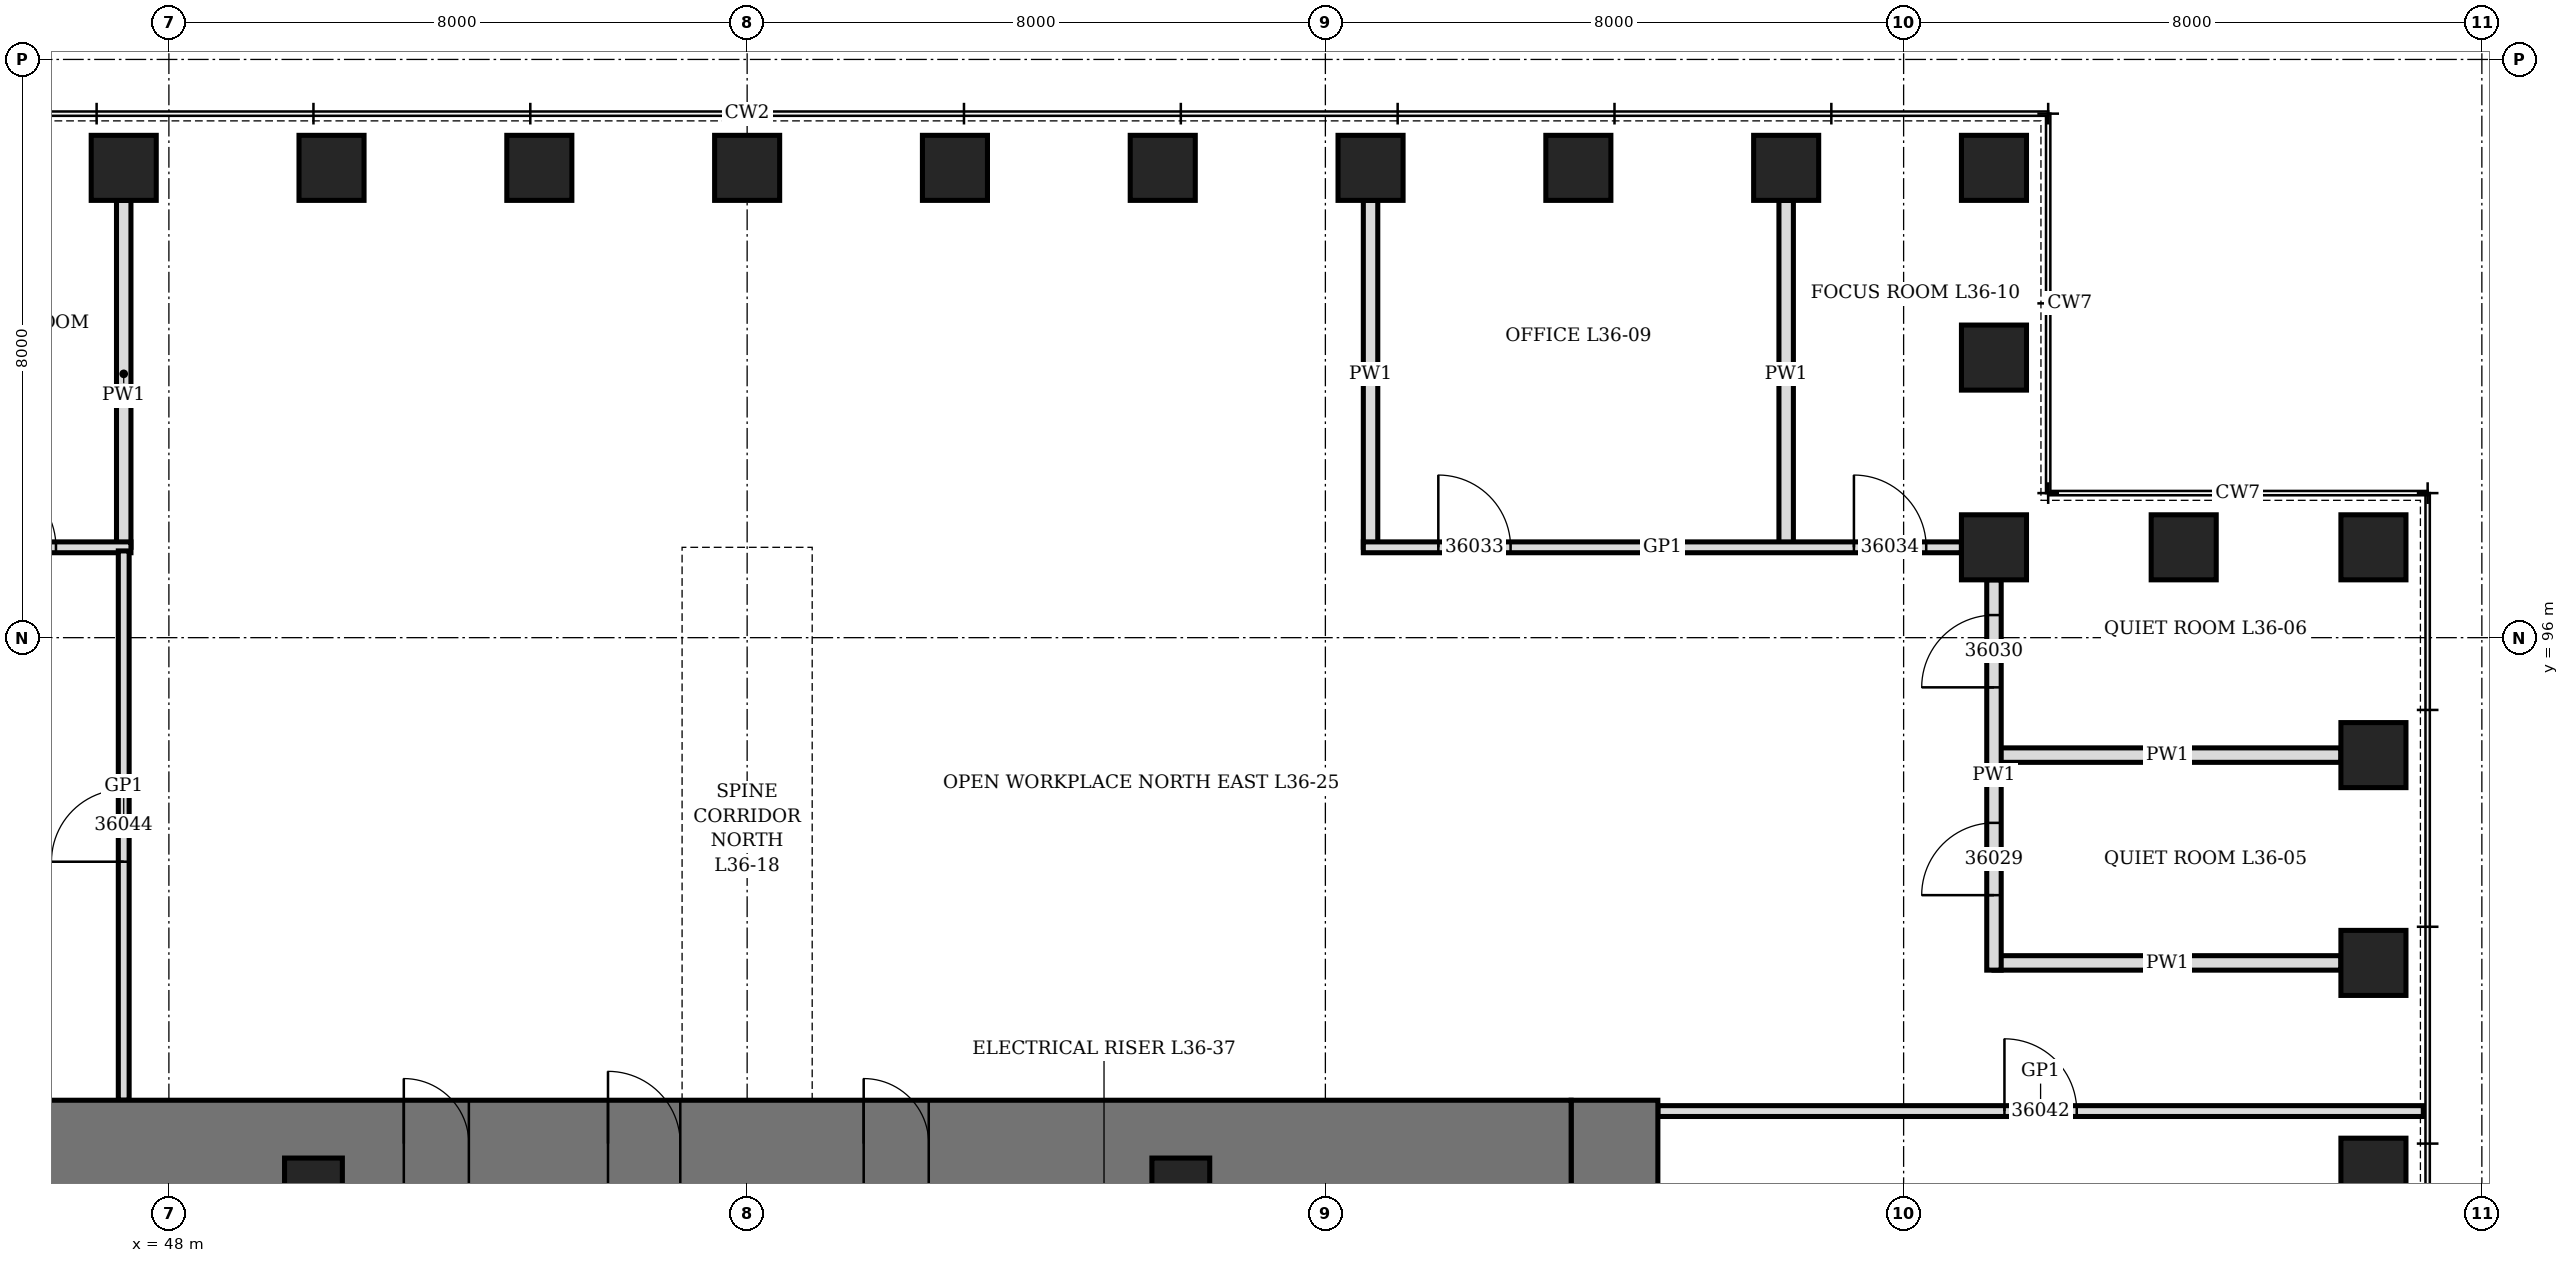
"""IFC4 building model, lengths in metres.
Left out: names, types, materials, properties, quantities, classifications, styles, units other than length and angle.
Written with IfcOpenShell. Run it as: python <this file> out.ifc"""

import sys

from ifc_helpers import new_model, si_unit, direction, frame, frame_2d, origin, origin_2d, place, context, subcontext, project, spatial, rectangle, hollow_rectangle, extrude, element, fill, save


model = new_model("IFC4")
c1 = context("Model", 3, precision=1e-05, world=origin(), true_north=direction((0.0, 1.0)))
c2 = subcontext(c1, "Body", "Model", "MODEL_VIEW")
j1 = project(units=[si_unit("LENGTHUNIT", "METRE"), si_unit("PLANEANGLEUNIT", "RADIAN")], contexts=[c1])
p1 = place(None, origin())
s1 = spatial("IfcSite", under=j1, at=p1, CompositionType="ELEMENT")
p2 = place(p1, origin())
s2 = spatial("IfcBuilding", under=s1, at=p2, CompositionType="ELEMENT")
p3 = place(p2, frame((0.0, 0.0, 162.7)))
s3 = spatial("IfcBuildingStorey", under=s2, at=p3, CompositionType="ELEMENT", Elevation=162.7)
for number, where, z_axis, x_axis in (
    (1, (78.5, 88.625, 0.0), (0.0, 0.0, 1.0), (0.0, 1.0, 0.0)),
    (2, (78.5, 91.5, 0.0), (0.0, 0.0, 1.0), (0.0, 1.0, 0.0)),
    (3, (78.5, 94.375, 0.0), (0.0, 0.0, 1.0), (0.0, 1.0, 0.0)),
    (4, (78.5, 97.25, 0.0), (0.0, 0.0, 1.0), (1.0, 0.0, 0.0)),
    (5, (75.875, 97.25, 0.0), (0.0, 0.0, 1.0), (1.0, 0.0, 0.0)),
    (6, (73.25, 97.25, 0.0), (0.0, 0.0, 1.0), (0.0, 1.0, 0.0)),
    (7, (73.25, 99.875, 0.0), (0.0, 0.0, 1.0), (0.0, 1.0, 0.0)),
    (8, (73.25, 102.5, 0.0), (0.0, 0.0, 1.0), (1.0, 0.0, 0.0)),
    (9, (70.375, 102.5, 0.0), (0.0, 0.0, 1.0), (1.0, 0.0, 0.0)),
    (10, (67.5, 102.5, 0.0), (0.0, 0.0, 1.0), (1.0, 0.0, 0.0)),
    (11, (64.625, 102.5, 0.0), (0.0, 0.0, 1.0), (1.0, 0.0, 0.0)),
    (12, (61.75, 102.5, 0.0), (0.0, 0.0, 1.0), (1.0, 0.0, 0.0)),
    (13, (58.875, 102.5, 0.0), (0.0, 0.0, 1.0), (1.0, 0.0, 0.0)),
    (14, (56.0, 102.5, 0.0), (0.0, 0.0, 1.0), (1.0, 0.0, 0.0)),
    (15, (53.125, 102.5, 0.0), (0.0, 0.0, 1.0), (1.0, 0.0, 0.0)),
    (16, (50.25, 102.5, 0.0), (0.0, 0.0, 1.0), (1.0, 0.0, 0.0)),
    (17, (47.375, 102.5, 0.0), (0.0, 0.0, 1.0), (1.0, 0.0, 0.0)),
):
    element("IfcColumn", number, at=place(p3, frame(where, z_axis=z_axis, x_axis=x_axis)), inside=s3, PredefinedType="COLUMN", context=c2, shape_type="SweptSolid", body=[
        extrude(hollow_rectangle(XDim=0.9, YDim=0.9, WallThickness=0.12, at=origin_2d()), origin(), (0.0, 0.0, 1.0), 4.2),
    ])
p4 = place(p3, frame((68.0, 70.4, 0.0), z_axis=(0.0, 0.0, 1.0), x_axis=(0.0, 1.0, 0.0)))
e18 = element("IfcWall", 18, at=p4, inside=s3, PredefinedType="SHEAR", context=c2, shape_type="SweptSolid", body=[
    extrude(rectangle(XDim=19.2, YDim=1.2, at=frame_2d((9.6, 0.0))), origin(), (0.0, 0.0, 1.0), 4.2),
])
p5 = place(p4, frame((8.6, 0.0, 0.0)))
e19 = element("IfcOpeningElement", 19, at=p5, cuts=e18, PredefinedType="OPENING", context=c2, shape_type="SweptSolid", body=[
    extrude(rectangle(XDim=2.0, YDim=2.4, at=frame_2d((1.0, 1.2))), frame((0.0, 0.61, 0.0), z_axis=(0.0, -1.0, 0.0), x_axis=(1.0, 0.0, 0.0)), (0.0, 0.0, 1.0), 1.22),
])
p6 = place(p3, frame((44.6, 89.0, 0.0), z_axis=(0.0, 0.0, 1.0), x_axis=(1.0, 0.0, 0.0)))
e20 = element("IfcWall", 20, at=p6, inside=s3, PredefinedType="SHEAR", context=c2, shape_type="SweptSolid", body=[
    extrude(rectangle(XDim=22.8, YDim=1.2, at=frame_2d((11.4, 0.0))), origin(), (0.0, 0.0, 1.0), 4.2),
])
p7 = place(p6, frame((9.475, 0.0, 0.0)))
e21 = element("IfcOpeningElement", 21, at=p7, cuts=e20, PredefinedType="OPENING", context=c2, shape_type="SweptSolid", body=[
    extrude(rectangle(XDim=1.0, YDim=2.1, at=frame_2d((0.5, 1.05))), frame((0.0, 0.61, 0.0), z_axis=(0.0, -1.0, 0.0), x_axis=(1.0, 0.0, 0.0)), (0.0, 0.0, 1.0), 1.22),
])
p8 = place(p6, frame((6.65, 0.0, 0.0)))
e22 = element("IfcOpeningElement", 22, at=p8, cuts=e20, PredefinedType="OPENING", context=c2, shape_type="SweptSolid", body=[
    extrude(rectangle(XDim=0.9, YDim=2.1, at=frame_2d((0.45, 1.05))), frame((0.0, 0.61, 0.0), z_axis=(0.0, -1.0, 0.0), x_axis=(1.0, 0.0, 0.0)), (0.0, 0.0, 1.0), 1.22),
])
p9 = place(p6, frame((13.012, 0.0, 0.0)))
e23 = element("IfcOpeningElement", 23, at=p9, cuts=e20, PredefinedType="OPENING", context=c2, shape_type="SweptSolid", body=[
    extrude(rectangle(XDim=0.9, YDim=2.1, at=frame_2d((0.45, 1.05))), frame((0.0, 0.61, 0.0), z_axis=(0.0, -1.0, 0.0), x_axis=(1.0, 0.0, 0.0)), (0.0, 0.0, 1.0), 1.22),
])
for number, where, z_axis, x_axis in (
    (24, (50.0, 88.4, 0.0), (0.0, 0.0, 1.0), (1.0, 0.0, 0.0)),
    (25, (62.0, 88.4, 0.0), (0.0, 0.0, 1.0), (1.0, 0.0, 0.0)),
):
    element("IfcColumn", number, at=place(p3, frame(where, z_axis=z_axis, x_axis=x_axis)), inside=s3, PredefinedType="COLUMN", context=c2, shape_type="SweptSolid", body=[
        extrude(hollow_rectangle(XDim=0.8, YDim=0.8, WallThickness=0.1, at=origin_2d()), origin(), (0.0, 0.0, 1.0), 4.2),
    ])
for number, where, z_axis, x_axis in (
    (26, (73.25, 91.5, 0.0), (0.0, 0.0, 1.0), (1.0, 0.0, 0.0)),
    (27, (73.25, 94.375, 0.0), (0.0, 0.0, 1.0), (1.0, 0.0, 0.0)),
):
    element("IfcWall", number, at=place(p3, frame(where, z_axis=z_axis, x_axis=x_axis)), inside=s3, PredefinedType="PARTITIONING", context=c2, shape_type="SweptSolid", body=[
        extrude(rectangle(XDim=4.8, YDim=0.2, at=frame_2d((2.4, 0.0))), origin(), (0.0, 0.0, 1.0), 3.428),
    ])
for number, where, z_axis, x_axis in (
    (28, (47.375, 97.25, 0.0), (0.0, 0.0, 1.0), (0.0, 1.0, 0.0)),
    (29, (64.625, 97.25, 0.0), (0.0, 0.0, 1.0), (0.0, 1.0, 0.0)),
):
    element("IfcWall", number, at=place(p3, frame(where, z_axis=z_axis, x_axis=x_axis)), inside=s3, PredefinedType="PARTITIONING", context=c2, shape_type="SweptSolid", body=[
        extrude(rectangle(XDim=4.8, YDim=0.2, at=frame_2d((2.4, 0.0))), origin(), (0.0, 0.0, 1.0), 3.278),
    ])
p10 = place(p3, frame((70.375, 97.25, 0.0), z_axis=(0.0, 0.0, 1.0), x_axis=(0.0, 1.0, 0.0)))
e30 = element("IfcWall", 30, at=p10, inside=s3, PredefinedType="PARTITIONING", context=c2, shape_type="SweptSolid", body=[
    extrude(rectangle(XDim=4.8, YDim=0.2, at=frame_2d((2.4, 0.0))), origin(), (0.0, 0.0, 1.0), 3.428),
])
p11 = place(p3, frame((68.6, 89.45, 0.0), z_axis=(0.0, 0.0, 1.0), x_axis=(1.0, 0.0, 0.0)))
e31 = element("IfcWall", 31, at=p11, inside=s3, PredefinedType="PARTITIONING", context=c2, shape_type="SweptSolid", body=[
    extrude(rectangle(XDim=10.59, YDim=0.15, at=frame_2d((5.295, 0.0))), origin(), (0.0, 0.0, 1.0), 4.04),
])
p12 = place(p11, frame((4.795, 0.0, 0.0)))
e32 = element("IfcOpeningElement", 32, at=p12, cuts=e31, PredefinedType="OPENING", context=c2, shape_type="SweptSolid", body=[
    extrude(rectangle(XDim=1.0, YDim=2.4, at=frame_2d((0.5, 1.2))), frame((0.0, 0.085, 0.0), z_axis=(0.0, -1.0, 0.0), x_axis=(1.0, 0.0, 0.0)), (0.0, 0.0, 1.0), 0.17),
])
p13 = place(p3, frame((39.2, 97.25, 0.0), z_axis=(0.0, 0.0, 1.0), x_axis=(1.0, 0.0, 0.0)))
e33 = element("IfcWall", 33, at=p13, inside=s3, PredefinedType="PARTITIONING", context=c2, shape_type="SweptSolid", body=[
    extrude(rectangle(XDim=8.275, YDim=0.15, at=frame_2d((4.138, 0.0))), origin(), (0.0, 0.0, 1.0), 4.04),
])
p14 = place(p13, frame((0.488, 0.0, 0.0)))
e34 = element("IfcOpeningElement", 34, at=p14, cuts=e33, PredefinedType="OPENING", context=c2, shape_type="SweptSolid", body=[
    extrude(rectangle(XDim=1.0, YDim=2.4, at=frame_2d((0.5, 1.2))), frame((0.0, 0.085, 0.0), z_axis=(0.0, -1.0, 0.0), x_axis=(1.0, 0.0, 0.0)), (0.0, 0.0, 1.0), 0.17),
])
p15 = place(p13, frame((6.238, 0.0, 0.0)))
e35 = element("IfcOpeningElement", 35, at=p15, cuts=e33, PredefinedType="OPENING", context=c2, shape_type="SweptSolid", body=[
    extrude(rectangle(XDim=1.0, YDim=2.4, at=frame_2d((0.5, 1.2))), frame((0.0, 0.085, 0.0), z_axis=(0.0, -1.0, 0.0), x_axis=(1.0, 0.0, 0.0)), (0.0, 0.0, 1.0), 0.17),
])
p16 = place(p3, frame((64.525, 97.25, 0.0), z_axis=(0.0, 0.0, 1.0), x_axis=(1.0, 0.0, 0.0)))
e36 = element("IfcWall", 36, at=p16, inside=s3, PredefinedType="PARTITIONING", context=c2, shape_type="SweptSolid", body=[
    extrude(rectangle(XDim=8.275, YDim=0.15, at=frame_2d((4.138, 0.0))), origin(), (0.0, 0.0, 1.0), 4.04),
])
p17 = place(p16, frame((1.038, 0.0, 0.0)))
e37 = element("IfcOpeningElement", 37, at=p17, cuts=e36, PredefinedType="OPENING", context=c2, shape_type="SweptSolid", body=[
    extrude(rectangle(XDim=1.0, YDim=2.1, at=frame_2d((0.5, 1.05))), frame((0.0, 0.085, 0.0), z_axis=(0.0, -1.0, 0.0), x_axis=(1.0, 0.0, 0.0)), (0.0, 0.0, 1.0), 0.17),
])
p18 = place(p16, frame((6.788, 0.0, 0.0)))
e38 = element("IfcOpeningElement", 38, at=p18, cuts=e36, PredefinedType="OPENING", context=c2, shape_type="SweptSolid", body=[
    extrude(rectangle(XDim=1.0, YDim=2.4, at=frame_2d((0.5, 1.2))), frame((0.0, 0.085, 0.0), z_axis=(0.0, -1.0, 0.0), x_axis=(1.0, 0.0, 0.0)), (0.0, 0.0, 1.0), 0.17),
])
p19 = place(p3, frame((47.375, 89.6, 0.0), z_axis=(0.0, 0.0, 1.0), x_axis=(0.0, 1.0, 0.0)))
e39 = element("IfcWall", 39, at=p19, inside=s3, PredefinedType="PARTITIONING", context=c2, shape_type="SweptSolid", body=[
    extrude(rectangle(XDim=7.6, YDim=0.15, at=frame_2d((3.8, 0.0))), origin(), (0.0, 0.0, 1.0), 3.278),
])
p20 = place(p19, frame((3.3, 0.0, 0.0)))
e40 = element("IfcOpeningElement", 40, at=p20, cuts=e39, PredefinedType="OPENING", context=c2, shape_type="SweptSolid", body=[
    extrude(rectangle(XDim=1.0, YDim=2.4, at=frame_2d((0.5, 1.2))), frame((0.0, 0.085, 0.0), z_axis=(0.0, -1.0, 0.0), x_axis=(1.0, 0.0, 0.0)), (0.0, 0.0, 1.0), 0.17),
])
p21 = place(p3, frame((73.25, 91.4, 0.0), z_axis=(0.0, 0.0, 1.0), x_axis=(0.0, 1.0, 0.0)))
e41 = element("IfcWall", 41, at=p21, inside=s3, PredefinedType="PARTITIONING", context=c2, shape_type="SweptSolid", body=[
    extrude(rectangle(XDim=5.4, YDim=0.2, at=frame_2d((2.7, 0.0))), origin(), (0.0, 0.0, 1.0), 4.04),
])
p22 = place(p21, frame((1.038, 0.0, 0.0)))
e42 = element("IfcOpeningElement", 42, at=p22, cuts=e41, PredefinedType="OPENING", context=c2, shape_type="SweptSolid", body=[
    extrude(rectangle(XDim=1.0, YDim=2.1, at=frame_2d((0.5, 1.05))), frame((0.0, 0.11, 0.0), z_axis=(0.0, -1.0, 0.0), x_axis=(1.0, 0.0, 0.0)), (0.0, 0.0, 1.0), 0.22),
])
p23 = place(p21, frame((3.913, 0.0, 0.0)))
e43 = element("IfcOpeningElement", 43, at=p23, cuts=e41, PredefinedType="OPENING", context=c2, shape_type="SweptSolid", body=[
    extrude(rectangle(XDim=1.0, YDim=2.1, at=frame_2d((0.5, 1.05))), frame((0.0, 0.11, 0.0), z_axis=(0.0, -1.0, 0.0), x_axis=(1.0, 0.0, 0.0)), (0.0, 0.0, 1.0), 0.22),
])
p24 = place(p7, origin())
e44 = element("IfcDoor", 44, at=p24, inside=s3, OperationType="SINGLE_SWING_LEFT", PredefinedType="DOOR", context=c2, shape_type="SweptSolid", body=[
    extrude(rectangle(XDim=1.0, YDim=2.1, at=frame_2d((0.5, 1.05))), frame((0.0, 0.35, 0.0), z_axis=(0.0, -1.0, 0.0), x_axis=(1.0, 0.0, 0.0)), (0.0, 0.0, 1.0), 0.7),
])
fill(e21, e44)
p25 = place(p8, origin())
e45 = element("IfcDoor", 45, at=p25, inside=s3, OperationType="SINGLE_SWING_LEFT", PredefinedType="DOOR", context=c2, shape_type="SweptSolid", body=[
    extrude(rectangle(XDim=0.9, YDim=2.1, at=frame_2d((0.45, 1.05))), frame((0.0, 0.35, 0.0), z_axis=(0.0, -1.0, 0.0), x_axis=(1.0, 0.0, 0.0)), (0.0, 0.0, 1.0), 0.7),
])
fill(e22, e45)
p26 = place(p9, origin())
e46 = element("IfcDoor", 46, at=p26, inside=s3, OperationType="SINGLE_SWING_LEFT", PredefinedType="DOOR", context=c2, shape_type="SweptSolid", body=[
    extrude(rectangle(XDim=0.9, YDim=2.1, at=frame_2d((0.45, 1.05))), frame((0.0, 0.35, 0.0), z_axis=(0.0, -1.0, 0.0), x_axis=(1.0, 0.0, 0.0)), (0.0, 0.0, 1.0), 0.7),
])
fill(e23, e46)
p27 = place(p22, origin())
e47 = element("IfcDoor", 47, at=p27, inside=s3, OperationType="SINGLE_SWING_LEFT", PredefinedType="DOOR", context=c2, shape_type="SweptSolid", body=[
    extrude(rectangle(XDim=1.0, YDim=2.1, at=frame_2d((0.5, 1.05))), frame((0.0, 0.1, 0.0), z_axis=(0.0, -1.0, 0.0), x_axis=(1.0, 0.0, 0.0)), (0.0, 0.0, 1.0), 0.199),
])
fill(e42, e47)
p28 = place(p23, origin())
e48 = element("IfcDoor", 48, at=p28, inside=s3, OperationType="SINGLE_SWING_LEFT", PredefinedType="DOOR", context=c2, shape_type="SweptSolid", body=[
    extrude(rectangle(XDim=1.0, YDim=2.1, at=frame_2d((0.5, 1.05))), frame((0.0, 0.1, 0.0), z_axis=(0.0, -1.0, 0.0), x_axis=(1.0, 0.0, 0.0)), (0.0, 0.0, 1.0), 0.199),
])
fill(e43, e48)
p29 = place(p15, origin())
e49 = element("IfcDoor", 49, at=p29, inside=s3, OperationType="SINGLE_SWING_RIGHT", PredefinedType="DOOR", context=c2, shape_type="SweptSolid", body=[
    extrude(rectangle(XDim=1.0, YDim=2.4, at=frame_2d((0.5, 1.2))), frame((0.0, 0.075, 0.0), z_axis=(0.0, -1.0, 0.0), x_axis=(1.0, 0.0, 0.0)), (0.0, 0.0, 1.0), 0.149),
])
fill(e35, e49)
p30 = place(p17, origin())
e50 = element("IfcDoor", 50, at=p30, inside=s3, OperationType="SINGLE_SWING_LEFT", PredefinedType="DOOR", context=c2, shape_type="SweptSolid", body=[
    extrude(rectangle(XDim=1.0, YDim=2.1, at=frame_2d((0.5, 1.05))), frame((0.0, 0.075, 0.0), z_axis=(0.0, -1.0, 0.0), x_axis=(1.0, 0.0, 0.0)), (0.0, 0.0, 1.0), 0.149),
])
fill(e37, e50)
p31 = place(p18, origin())
e51 = element("IfcDoor", 51, at=p31, inside=s3, OperationType="SINGLE_SWING_RIGHT", PredefinedType="DOOR", context=c2, shape_type="SweptSolid", body=[
    extrude(rectangle(XDim=1.0, YDim=2.4, at=frame_2d((0.5, 1.2))), frame((0.0, 0.075, 0.0), z_axis=(0.0, -1.0, 0.0), x_axis=(1.0, 0.0, 0.0)), (0.0, 0.0, 1.0), 0.149),
])
fill(e38, e51)
p32 = place(p12, origin())
e52 = element("IfcDoor", 52, at=p32, inside=s3, OperationType="SINGLE_SWING_RIGHT", PredefinedType="DOOR", context=c2, shape_type="SweptSolid", body=[
    extrude(rectangle(XDim=1.0, YDim=2.4, at=frame_2d((0.5, 1.2))), frame((0.0, 0.075, 0.0), z_axis=(0.0, -1.0, 0.0), x_axis=(1.0, 0.0, 0.0)), (0.0, 0.0, 1.0), 0.149),
])
fill(e32, e52)
p33 = place(p20, origin())
e53 = element("IfcDoor", 53, at=p33, inside=s3, OperationType="SINGLE_SWING_RIGHT", PredefinedType="DOOR", context=c2, shape_type="SweptSolid", body=[
    extrude(rectangle(XDim=1.0, YDim=2.4, at=frame_2d((0.5, 1.2))), frame((0.0, 0.075, 0.0), z_axis=(0.0, -1.0, 0.0), x_axis=(1.0, 0.0, 0.0)), (0.0, 0.0, 1.0), 0.149),
])
fill(e40, e53)
save(model, sys.argv[1])
